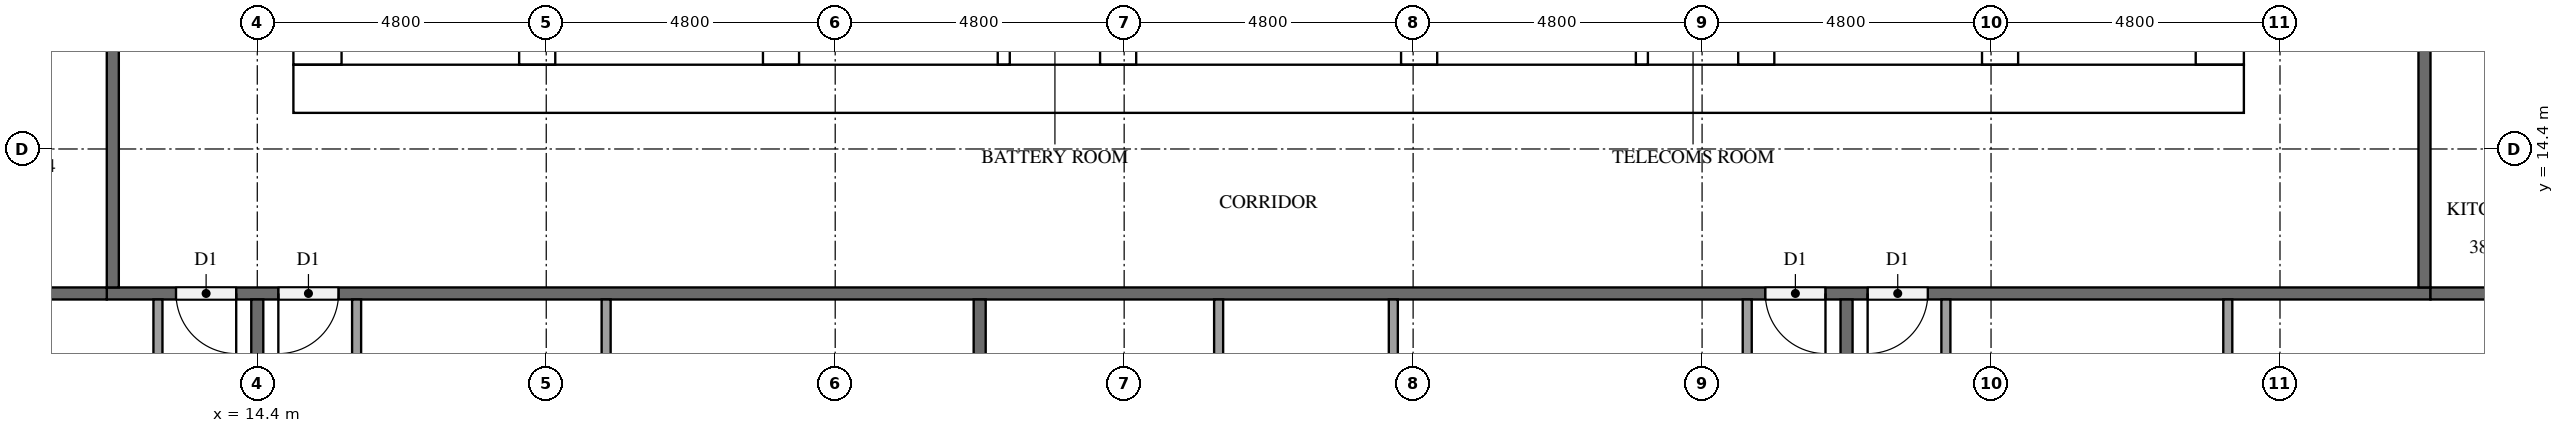
"""IFC4 building model, lengths in metres.
Left out: names, types, materials, properties, quantities, classifications, styles, units other than length and angle.
Written with IfcOpenShell. Run it as: python <this file> out.ifc"""

import sys

from ifc_helpers import new_model, si_unit, direction, frame, frame_2d, origin, place, context, subcontext, project, spatial, rectangle, extrude, element, fill, save


model = new_model("IFC4")
c1 = context("Model", 3, precision=1e-05, world=origin(), true_north=direction((0.0, 1.0)))
c2 = subcontext(c1, "Body", "Model", "MODEL_VIEW")
j1 = project(units=[si_unit("LENGTHUNIT", "METRE"), si_unit("PLANEANGLEUNIT", "RADIAN")], contexts=[c1])
p1 = place(None, origin())
s1 = spatial("IfcSite", under=j1, at=p1, CompositionType="ELEMENT")
p2 = place(p1, origin())
s2 = spatial("IfcBuilding", under=s1, at=p2, CompositionType="ELEMENT")
p3 = place(p2, frame((0.0, 0.0, 149.0)))
s3 = spatial("IfcBuildingStorey", under=s2, at=p3, CompositionType="ELEMENT", Elevation=149.0)
p4 = place(p3, frame((15.0, 15.4, 0.0), z_axis=(0.0, 0.0, 1.0), x_axis=(1.0, 0.0, 0.0)))
e1 = element("IfcWall", 1, at=p4, inside=s3, PredefinedType="SHEAR", context=c2, shape_type="SweptSolid", body=[
    extrude(rectangle(XDim=32.4, YDim=0.8, at=frame_2d((16.2, 0.0))), origin(), (0.0, 0.0, 1.0), 3.2),
])
p5 = place(p4, frame((15.3, 0.0, 0.0)))
e2 = element("IfcOpeningElement", 2, at=p5, cuts=e1, PredefinedType="OPENING", context=c2, shape_type="SweptSolid", body=[
    extrude(rectangle(XDim=1.8, YDim=2.1, at=frame_2d((0.9, 1.05))), frame((0.0, 0.41, 0.0), z_axis=(0.0, -1.0, 0.0), x_axis=(1.0, 0.0, 0.0)), (0.0, 0.0, 1.0), 0.82),
])
p6 = place(p3, frame((15.4, 15.8, 0.0), z_axis=(0.0, 0.0, 1.0), x_axis=(0.0, 1.0, 0.0)))
e3 = element("IfcWall", 3, at=p6, inside=s3, PredefinedType="SHEAR", context=c2, shape_type="SweptSolid", body=[
    extrude(rectangle(XDim=21.2, YDim=0.8, at=frame_2d((10.6, 0.0))), origin(), (0.0, 0.0, 1.0), 3.2),
])
p7 = place(p6, frame((4.96, 0.0, 0.0)))
e4 = element("IfcOpeningElement", 4, at=p7, cuts=e3, PredefinedType="OPENING", context=c2, shape_type="SweptSolid", body=[
    extrude(rectangle(XDim=1.2, YDim=2.1, at=frame_2d((0.6, 1.05))), frame((0.0, 0.41, 0.0), z_axis=(0.0, -1.0, 0.0), x_axis=(1.0, 0.0, 0.0)), (0.0, 0.0, 1.0), 0.82),
])
p8 = place(p3, frame((47.0, 15.8, 0.0), z_axis=(0.0, 0.0, 1.0), x_axis=(0.0, 1.0, 0.0)))
e5 = element("IfcWall", 5, at=p8, inside=s3, PredefinedType="SHEAR", context=c2, shape_type="SweptSolid", body=[
    extrude(rectangle(XDim=21.2, YDim=0.8, at=frame_2d((10.6, 0.0))), origin(), (0.0, 0.0, 1.0), 3.2),
])
p9 = place(p8, frame((10.3, 0.0, 0.0)))
e6 = element("IfcOpeningElement", 6, at=p9, cuts=e5, PredefinedType="OPENING", context=c2, shape_type="SweptSolid", body=[
    extrude(rectangle(XDim=1.2, YDim=2.1, at=frame_2d((0.6, 1.05))), frame((0.0, 0.41, 0.0), z_axis=(0.0, -1.0, 0.0), x_axis=(1.0, 0.0, 0.0)), (0.0, 0.0, 1.0), 0.82),
])
p10 = place(p3, frame((19.05, 15.8, 0.0), z_axis=(0.0, 0.0, 1.0), x_axis=(0.0, 1.0, 0.0)))
e7 = element("IfcWall", 7, at=p10, inside=s3, PredefinedType="SHEAR", context=c2, shape_type="SweptSolid", body=[
    extrude(rectangle(XDim=15.15, YDim=0.6, at=frame_2d((7.575, 0.0))), origin(), (0.0, 0.0, 1.0), 3.2),
])
p11 = place(p10, frame((9.65, 0.0, 0.0)))
e8 = element("IfcOpeningElement", 8, at=p11, cuts=e7, PredefinedType="OPENING", context=c2, shape_type="SweptSolid", body=[
    extrude(rectangle(XDim=1.1, YDim=2.1, at=frame_2d((0.55, 1.05))), frame((0.0, 0.31, 0.0), z_axis=(0.0, -1.0, 0.0), x_axis=(1.0, 0.0, 0.0)), (0.0, 0.0, 1.0), 0.62),
])
p12 = place(p10, frame((13.15, 0.0, 0.0)))
e9 = element("IfcOpeningElement", 9, at=p12, cuts=e7, PredefinedType="OPENING", context=c2, shape_type="SweptSolid", body=[
    extrude(rectangle(XDim=1.1, YDim=2.1, at=frame_2d((0.55, 1.05))), frame((0.0, 0.31, 0.0), z_axis=(0.0, -1.0, 0.0), x_axis=(1.0, 0.0, 0.0)), (0.0, 0.0, 1.0), 0.62),
])
p13 = place(p10, frame((0.4, 0.0, 0.0)))
e10 = element("IfcOpeningElement", 10, at=p13, cuts=e7, PredefinedType="OPENING", context=c2, shape_type="SweptSolid", body=[
    extrude(rectangle(XDim=1.2, YDim=2.1, at=frame_2d((0.6, 1.05))), frame((0.0, 0.31, 0.0), z_axis=(0.0, -1.0, 0.0), x_axis=(1.0, 0.0, 0.0)), (0.0, 0.0, 1.0), 0.62),
])
p14 = place(p3, frame((23.1, 15.8, 0.0), z_axis=(0.0, 0.0, 1.0), x_axis=(0.0, 1.0, 0.0)))
e11 = element("IfcWall", 11, at=p14, inside=s3, PredefinedType="SHEAR", context=c2, shape_type="SweptSolid", body=[
    extrude(rectangle(XDim=21.2, YDim=0.6, at=frame_2d((10.6, 0.0))), origin(), (0.0, 0.0, 1.0), 3.2),
])
p15 = place(p3, frame((39.3, 15.8, 0.0), z_axis=(0.0, 0.0, 1.0), x_axis=(0.0, 1.0, 0.0)))
e12 = element("IfcWall", 12, at=p15, inside=s3, PredefinedType="SHEAR", context=c2, shape_type="SweptSolid", body=[
    extrude(rectangle(XDim=8.45, YDim=0.6, at=frame_2d((4.225, 0.0))), origin(), (0.0, 0.0, 1.0), 3.2),
])
p16 = place(p3, frame((43.35, 15.8, 0.0), z_axis=(0.0, 0.0, 1.0), x_axis=(0.0, 1.0, 0.0)))
e13 = element("IfcWall", 13, at=p16, inside=s3, PredefinedType="SHEAR", context=c2, shape_type="SweptSolid", body=[
    extrude(rectangle(XDim=8.45, YDim=0.6, at=frame_2d((4.225, 0.0))), origin(), (0.0, 0.0, 1.0), 3.2),
])
p17 = place(p16, frame((0.4, 0.0, 0.0)))
e14 = element("IfcOpeningElement", 14, at=p17, cuts=e13, PredefinedType="OPENING", context=c2, shape_type="SweptSolid", body=[
    extrude(rectangle(XDim=1.2, YDim=2.1, at=frame_2d((0.6, 1.05))), frame((0.0, 0.31, 0.0), z_axis=(0.0, -1.0, 0.0), x_axis=(1.0, 0.0, 0.0)), (0.0, 0.0, 1.0), 0.62),
])
for number, where, z_axis, x_axis in (
    (15, (28.7, 15.8, 0.0), (0.0, 0.0, 1.0), (0.0, 1.0, 0.0)),
    (16, (33.7, 15.8, 0.0), (0.0, 0.0, 1.0), (0.0, 1.0, 0.0)),
):
    element("IfcWall", number, at=place(p3, frame(where, z_axis=z_axis, x_axis=x_axis)), inside=s3, PredefinedType="SHEAR", context=c2, shape_type="SweptSolid", body=[
        extrude(rectangle(XDim=2.65, YDim=0.6, at=frame_2d((1.325, 0.0))), origin(), (0.0, 0.0, 1.0), 3.2),
    ])
for number, where, z_axis, x_axis in (
    (17, (26.8, 15.8, 0.0), (0.0, 0.0, 1.0), (0.0, 1.0, 0.0)),
    (18, (37.4, 15.8, 0.0), (0.0, 0.0, 1.0), (0.0, 1.0, 0.0)),
):
    element("IfcWall", number, at=place(p3, frame(where, z_axis=z_axis, x_axis=x_axis)), inside=s3, PredefinedType="PARTITIONING", context=c2, shape_type="SweptSolid", body=[
        extrude(rectangle(XDim=2.65, YDim=0.2, at=frame_2d((1.325, 0.0))), origin(), (0.0, 0.0, 1.0), 3.2),
    ])
p18 = place(p3, frame((50.5, 12.0, 0.0), z_axis=(0.0, 0.0, 1.0), x_axis=(-1.0, 0.0, 0.0)))
e19 = element("IfcWall", 19, at=p18, inside=s3, PredefinedType="PARTITIONING", context=c2, shape_type="SweptSolid", body=[
    extrude(rectangle(XDim=38.6, YDim=0.2, at=frame_2d((19.3, 0.0))), origin(), (0.0, 0.0, 1.0), 3.2),
])
p19 = place(p18, frame((36.45, 0.0, 0.0)))
e20 = element("IfcOpeningElement", 20, at=p19, cuts=e19, PredefinedType="OPENING", context=c2, shape_type="SweptSolid", body=[
    extrude(rectangle(XDim=1.0, YDim=2.1, at=frame_2d((0.5, 1.05))), frame((0.0, 0.11, 0.0), z_axis=(0.0, -1.0, 0.0), x_axis=(1.0, 0.0, 0.0)), (0.0, 0.0, 1.0), 0.22),
])
p20 = place(p18, frame((34.75, 0.0, 0.0)))
e21 = element("IfcOpeningElement", 21, at=p20, cuts=e19, PredefinedType="OPENING", context=c2, shape_type="SweptSolid", body=[
    extrude(rectangle(XDim=1.0, YDim=2.1, at=frame_2d((0.5, 1.05))), frame((0.0, 0.11, 0.0), z_axis=(0.0, -1.0, 0.0), x_axis=(1.0, 0.0, 0.0)), (0.0, 0.0, 1.0), 0.22),
])
p21 = place(p18, frame((10.05, 0.0, 0.0)))
e22 = element("IfcOpeningElement", 22, at=p21, cuts=e19, PredefinedType="OPENING", context=c2, shape_type="SweptSolid", body=[
    extrude(rectangle(XDim=1.0, YDim=2.1, at=frame_2d((0.5, 1.05))), frame((0.0, 0.11, 0.0), z_axis=(0.0, -1.0, 0.0), x_axis=(1.0, 0.0, 0.0)), (0.0, 0.0, 1.0), 0.22),
])
p22 = place(p18, frame((8.35, 0.0, 0.0)))
e23 = element("IfcOpeningElement", 23, at=p22, cuts=e19, PredefinedType="OPENING", context=c2, shape_type="SweptSolid", body=[
    extrude(rectangle(XDim=1.0, YDim=2.1, at=frame_2d((0.5, 1.05))), frame((0.0, 0.11, 0.0), z_axis=(0.0, -1.0, 0.0), x_axis=(1.0, 0.0, 0.0)), (0.0, 0.0, 1.0), 0.22),
])
p23 = place(p3, frame((50.4, 40.7, 0.0), z_axis=(0.0, 0.0, 1.0), x_axis=(0.0, -1.0, 0.0)))
e24 = element("IfcWall", 24, at=p23, inside=s3, PredefinedType="PARTITIONING", context=c2, shape_type="SweptSolid", body=[
    extrude(rectangle(XDim=28.6, YDim=0.2, at=frame_2d((14.3, 0.0))), origin(), (0.0, 0.0, 1.0), 3.2),
])
p24 = place(p23, frame((17.05, 0.0, 0.0)))
e25 = element("IfcOpeningElement", 25, at=p24, cuts=e24, PredefinedType="OPENING", context=c2, shape_type="SweptSolid", body=[
    extrude(rectangle(XDim=1.0, YDim=2.1, at=frame_2d((0.5, 1.05))), frame((0.0, 0.11, 0.0), z_axis=(0.0, -1.0, 0.0), x_axis=(1.0, 0.0, 0.0)), (0.0, 0.0, 1.0), 0.22),
])
p25 = place(p23, frame((15.35, 0.0, 0.0)))
e26 = element("IfcOpeningElement", 26, at=p25, cuts=e24, PredefinedType="OPENING", context=c2, shape_type="SweptSolid", body=[
    extrude(rectangle(XDim=1.0, YDim=2.1, at=frame_2d((0.5, 1.05))), frame((0.0, 0.11, 0.0), z_axis=(0.0, -1.0, 0.0), x_axis=(1.0, 0.0, 0.0)), (0.0, 0.0, 1.0), 0.22),
])
p26 = place(p23, frame((5.75, 0.0, 0.0)))
e27 = element("IfcOpeningElement", 27, at=p26, cuts=e24, PredefinedType="OPENING", context=c2, shape_type="SweptSolid", body=[
    extrude(rectangle(XDim=1.0, YDim=2.1, at=frame_2d((0.5, 1.05))), frame((0.0, 0.11, 0.0), z_axis=(0.0, -1.0, 0.0), x_axis=(1.0, 0.0, 0.0)), (0.0, 0.0, 1.0), 0.22),
])
p27 = place(p3, frame((12.0, 12.1, 0.0), z_axis=(0.0, 0.0, 1.0), x_axis=(0.0, 1.0, 0.0)))
e28 = element("IfcWall", 28, at=p27, inside=s3, PredefinedType="PARTITIONING", context=c2, shape_type="SweptSolid", body=[
    extrude(rectangle(XDim=28.6, YDim=0.2, at=frame_2d((14.3, 0.0))), origin(), (0.0, 0.0, 1.0), 3.2),
])
p28 = place(p27, frame((27.35, 0.0, 0.0)))
e29 = element("IfcOpeningElement", 29, at=p28, cuts=e28, PredefinedType="OPENING", context=c2, shape_type="SweptSolid", body=[
    extrude(rectangle(XDim=1.0, YDim=2.1, at=frame_2d((0.5, 1.05))), frame((0.0, 0.11, 0.0), z_axis=(0.0, -1.0, 0.0), x_axis=(1.0, 0.0, 0.0)), (0.0, 0.0, 1.0), 0.22),
])
p29 = place(p27, frame((20.15, 0.0, 0.0)))
e30 = element("IfcOpeningElement", 30, at=p29, cuts=e28, PredefinedType="OPENING", context=c2, shape_type="SweptSolid", body=[
    extrude(rectangle(XDim=1.0, YDim=2.1, at=frame_2d((0.5, 1.05))), frame((0.0, 0.11, 0.0), z_axis=(0.0, -1.0, 0.0), x_axis=(1.0, 0.0, 0.0)), (0.0, 0.0, 1.0), 0.22),
])
p30 = place(p27, frame((10.55, 0.0, 0.0)))
e31 = element("IfcOpeningElement", 31, at=p30, cuts=e28, PredefinedType="OPENING", context=c2, shape_type="SweptSolid", body=[
    extrude(rectangle(XDim=1.0, YDim=2.1, at=frame_2d((0.5, 1.05))), frame((0.0, 0.11, 0.0), z_axis=(0.0, -1.0, 0.0), x_axis=(1.0, 0.0, 0.0)), (0.0, 0.0, 1.0), 0.22),
])
p31 = place(p3, frame((14.4, 11.9, 0.0), z_axis=(0.0, 0.0, 1.0), x_axis=(0.0, -1.0, 0.0)))
e32 = element("IfcWall", 32, at=p31, inside=s3, PredefinedType="PARTITIONING", context=c2, shape_type="SweptSolid", body=[
    extrude(rectangle(XDim=11.525, YDim=0.2, at=frame_2d((5.762, 0.0))), origin(), (0.0, 0.0, 1.0), 3.2),
])
for number, where, z_axis, x_axis in (
    (33, (0.1, 12.0, 0.0), (0.0, 0.0, 1.0), (1.0, 0.0, 0.0)),
    (34, (26.4, 11.9, 0.0), (0.0, 0.0, 1.0), (0.0, -1.0, 0.0)),
    (35, (40.8, 11.9, 0.0), (0.0, 0.0, 1.0), (0.0, -1.0, 0.0)),
):
    element("IfcWall", number, at=place(p3, frame(where, z_axis=z_axis, x_axis=x_axis)), inside=s3, PredefinedType="PARTITIONING", context=c2, shape_type="SweptSolid", body=[
        extrude(rectangle(XDim=11.8, YDim=0.2, at=frame_2d((5.9, 0.0))), origin(), (0.0, 0.0, 1.0), 3.2),
    ])
p32 = place(p3, frame((50.5, 12.0, 0.0), z_axis=(0.0, 0.0, 1.0), x_axis=(1.0, 0.0, 0.0)))
e36 = element("IfcWall", 36, at=p32, inside=s3, PredefinedType="PARTITIONING", context=c2, shape_type="SweptSolid", body=[
    extrude(rectangle(XDim=7.0, YDim=0.2, at=frame_2d((3.5, 0.0))), origin(), (0.0, 0.0, 1.0), 3.2),
])
p33 = place(p3, frame((12.75, 11.9, 0.0), z_axis=(0.0, 0.0, 1.0), x_axis=(0.0, -1.0, 0.0)))
e37 = element("IfcWall", 37, at=p33, inside=s3, PredefinedType="PARTITIONING", context=c2, shape_type="SweptSolid", body=[
    extrude(rectangle(XDim=3.125, YDim=0.15, at=frame_2d((1.562, 0.0))), origin(), (0.0, 0.0, 1.0), 3.2),
])
p34 = place(p3, frame((20.195, 11.9, 0.0), z_axis=(0.0, 0.0, 1.0), x_axis=(0.0, -1.0, 0.0)))
e38 = element("IfcWall", 38, at=p34, inside=s3, PredefinedType="PARTITIONING", context=c2, shape_type="SweptSolid", body=[
    extrude(rectangle(XDim=2.975, YDim=0.15, at=frame_2d((1.487, 0.0))), origin(), (0.0, 0.0, 1.0), 3.2),
])
p35 = place(p3, frame((16.05, 11.9, 0.0), z_axis=(0.0, 0.0, 1.0), x_axis=(0.0, -1.0, 0.0)))
e39 = element("IfcWall", 39, at=p35, inside=s3, PredefinedType="PARTITIONING", context=c2, shape_type="SweptSolid", body=[
    extrude(rectangle(XDim=3.125, YDim=0.15, at=frame_2d((1.562, 0.0))), origin(), (0.0, 0.0, 1.0), 3.2),
])
for number, where, z_axis, x_axis in (
    (40, (33.271, 11.9, 0.0), (0.0, 0.0, 1.0), (0.0, -1.0, 0.0)),
    (41, (30.369, 11.9, 0.0), (0.0, 0.0, 1.0), (0.0, -1.0, 0.0)),
):
    element("IfcWall", number, at=place(p3, frame(where, z_axis=z_axis, x_axis=x_axis)), inside=s3, PredefinedType="PARTITIONING", context=c2, shape_type="SweptSolid", body=[
        extrude(rectangle(XDim=3.875, YDim=0.15, at=frame_2d((1.938, 0.0))), origin(), (0.0, 0.0, 1.0), 3.2),
    ])
p36 = place(p3, frame((39.15, 11.9, 0.0), z_axis=(0.0, 0.0, 1.0), x_axis=(0.0, -1.0, 0.0)))
e42 = element("IfcWall", 42, at=p36, inside=s3, PredefinedType="PARTITIONING", context=c2, shape_type="SweptSolid", body=[
    extrude(rectangle(XDim=4.025, YDim=0.15, at=frame_2d((2.012, 0.0))), origin(), (0.0, 0.0, 1.0), 3.2),
])
p37 = place(p3, frame((47.133, 11.9, 0.0), z_axis=(0.0, 0.0, 1.0), x_axis=(0.0, -1.0, 0.0)))
e43 = element("IfcWall", 43, at=p37, inside=s3, PredefinedType="PARTITIONING", context=c2, shape_type="SweptSolid", body=[
    extrude(rectangle(XDim=4.175, YDim=0.15, at=frame_2d((2.087, 0.0))), origin(), (0.0, 0.0, 1.0), 3.2),
])
p38 = place(p3, frame((42.45, 11.9, 0.0), z_axis=(0.0, 0.0, 1.0), x_axis=(0.0, -1.0, 0.0)))
e44 = element("IfcWall", 44, at=p38, inside=s3, PredefinedType="PARTITIONING", context=c2, shape_type="SweptSolid", body=[
    extrude(rectangle(XDim=4.325, YDim=0.15, at=frame_2d((2.163, 0.0))), origin(), (0.0, 0.0, 1.0), 3.2),
])
p39 = place(p5, frame((1.8, 0.0, 0.0), z_axis=(0.0, 0.0, 1.0), x_axis=(-1.0, 0.0, 0.0)))
e45 = element("IfcDoor", 45, at=p39, inside=s3, OperationType="DOUBLE_DOOR_SINGLE_SWING", PredefinedType="DOOR", context=c2, shape_type="SweptSolid", body=[
    extrude(rectangle(XDim=1.8, YDim=2.1, at=frame_2d((0.9, 1.05))), frame((0.0, 0.025, 0.0), z_axis=(0.0, -1.0, 0.0), x_axis=(1.0, 0.0, 0.0)), (0.0, 0.0, 1.0), 0.05),
])
fill(e2, e45)
p40 = place(p19, origin())
e46 = element("IfcDoor", 46, at=p40, inside=s3, OperationType="SINGLE_SWING_LEFT", PredefinedType="DOOR", context=c2, shape_type="SweptSolid", body=[
    extrude(rectangle(XDim=1.0, YDim=2.1, at=frame_2d((0.5, 1.05))), frame((0.0, 0.025, 0.0), z_axis=(0.0, -1.0, 0.0), x_axis=(1.0, 0.0, 0.0)), (0.0, 0.0, 1.0), 0.05),
])
fill(e20, e46)
p41 = place(p20, origin())
e47 = element("IfcDoor", 47, at=p41, inside=s3, OperationType="SINGLE_SWING_RIGHT", PredefinedType="DOOR", context=c2, shape_type="SweptSolid", body=[
    extrude(rectangle(XDim=1.0, YDim=2.1, at=frame_2d((0.5, 1.05))), frame((0.0, 0.025, 0.0), z_axis=(0.0, -1.0, 0.0), x_axis=(1.0, 0.0, 0.0)), (0.0, 0.0, 1.0), 0.05),
])
fill(e21, e47)
p42 = place(p21, origin())
e48 = element("IfcDoor", 48, at=p42, inside=s3, OperationType="SINGLE_SWING_LEFT", PredefinedType="DOOR", context=c2, shape_type="SweptSolid", body=[
    extrude(rectangle(XDim=1.0, YDim=2.1, at=frame_2d((0.5, 1.05))), frame((0.0, 0.025, 0.0), z_axis=(0.0, -1.0, 0.0), x_axis=(1.0, 0.0, 0.0)), (0.0, 0.0, 1.0), 0.05),
])
fill(e22, e48)
p43 = place(p22, origin())
e49 = element("IfcDoor", 49, at=p43, inside=s3, OperationType="SINGLE_SWING_RIGHT", PredefinedType="DOOR", context=c2, shape_type="SweptSolid", body=[
    extrude(rectangle(XDim=1.0, YDim=2.1, at=frame_2d((0.5, 1.05))), frame((0.0, 0.025, 0.0), z_axis=(0.0, -1.0, 0.0), x_axis=(1.0, 0.0, 0.0)), (0.0, 0.0, 1.0), 0.05),
])
fill(e23, e49)
save(model, sys.argv[1])
